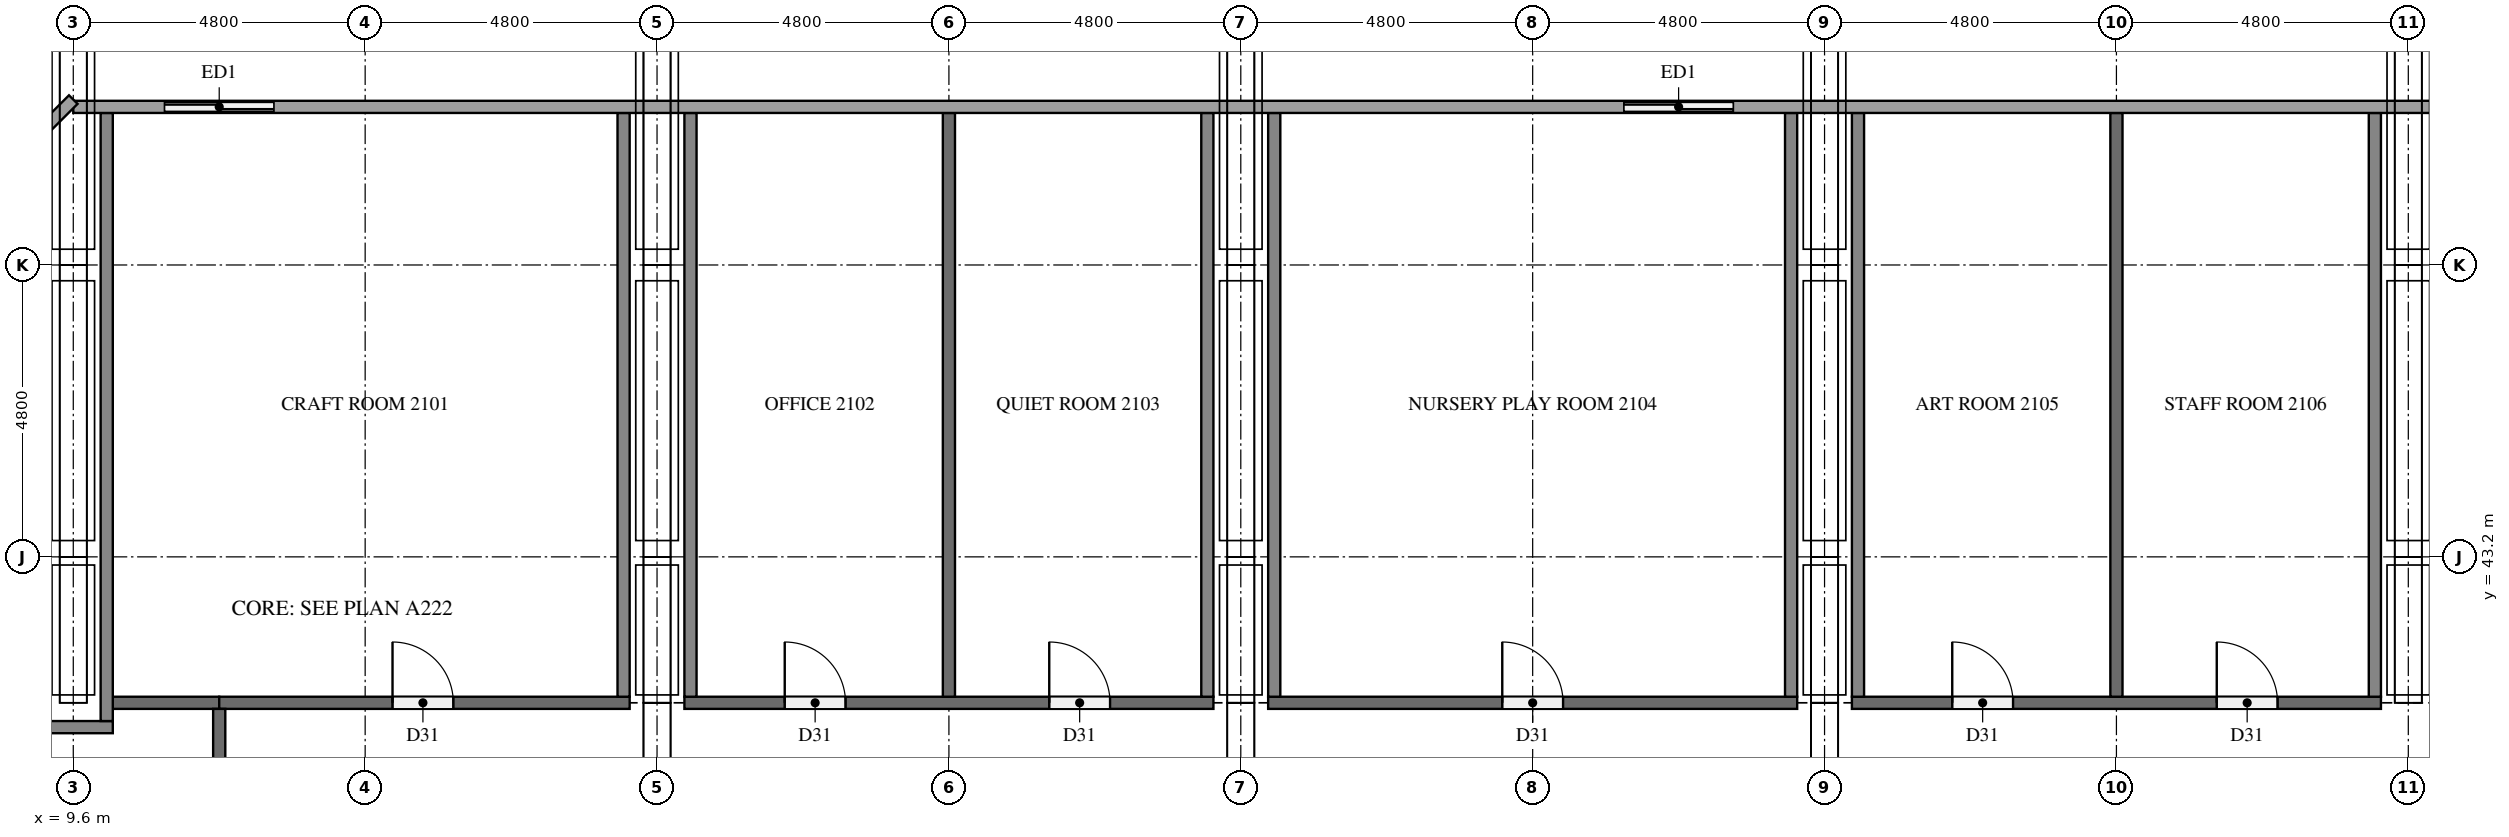
"""IFC4 building model, lengths in metres.
Left out: names, types, materials, properties, quantities, classifications, styles, units other than length and angle.
Written with IfcOpenShell. Run it as: python <this file> out.ifc"""

import sys

from ifc_helpers import new_model, si_unit, direction, frame, frame_2d, origin, place, context, subcontext, project, spatial, rectangle, extrude, element, fill, save


model = new_model("IFC4")
c1 = context("Model", 3, precision=1e-05, world=origin(), true_north=direction((0.0, 1.0)))
c2 = subcontext(c1, "Body", "Model", "MODEL_VIEW")
j1 = project(units=[si_unit("LENGTHUNIT", "METRE"), si_unit("PLANEANGLEUNIT", "RADIAN")], contexts=[c1])
p1 = place(None, origin())
s1 = spatial("IfcSite", under=j1, at=p1, CompositionType="ELEMENT")
p2 = place(p1, origin())
s2 = spatial("IfcBuilding", under=s1, at=p2, CompositionType="ELEMENT")
p3 = place(p2, frame((0.0, 0.0, 83.8)))
s3 = spatial("IfcBuildingStorey", under=s2, at=p3, CompositionType="ELEMENT", Elevation=83.8)
p4 = place(p3, frame((37.2, 50.6, 0.0), z_axis=(0.0, 0.0, 1.0), x_axis=(-1.0, 0.0, 0.0)))
e1 = element("IfcWall", 1, at=p4, inside=s3, PredefinedType="SOLIDWALL", context=c2, shape_type="SweptSolid", body=[
    extrude(rectangle(XDim=2.4, YDim=0.15, at=frame_2d((1.2, 0.0))), origin(), (0.0, 0.0, 1.0), 5.1),
])
p5 = place(p4, frame((0.3, 0.0, 0.0)))
e2 = element("IfcOpeningElement", 2, at=p5, cuts=e1, PredefinedType="OPENING", context=c2, shape_type="SweptSolid", body=[
    extrude(rectangle(XDim=1.8, YDim=2.4, at=frame_2d((0.9, 1.2))), frame((0.0, 0.085, 0.0), z_axis=(0.0, -1.0, 0.0), x_axis=(1.0, 0.0, 0.0)), (0.0, 0.0, 1.0), 0.17),
])
p6 = place(p3, frame((13.2, 50.6, 0.0), z_axis=(0.0, 0.0, 1.0), x_axis=(-1.0, 0.0, 0.0)))
e3 = element("IfcWall", 3, at=p6, inside=s3, PredefinedType="SOLIDWALL", context=c2, shape_type="SweptSolid", body=[
    extrude(rectangle(XDim=2.4, YDim=0.15, at=frame_2d((1.2, 0.0))), origin(), (0.0, 0.0, 1.0), 5.1),
])
p7 = place(p6, frame((0.3, 0.0, 0.0)))
e4 = element("IfcOpeningElement", 4, at=p7, cuts=e3, PredefinedType="OPENING", context=c2, shape_type="SweptSolid", body=[
    extrude(rectangle(XDim=1.8, YDim=2.4, at=frame_2d((0.9, 1.2))), frame((0.0, 0.085, 0.0), z_axis=(0.0, -1.0, 0.0), x_axis=(1.0, 0.0, 0.0)), (0.0, 0.0, 1.0), 0.17),
])
p8 = place(p3, frame((8.95, 40.4, 0.0), z_axis=(0.0, 0.0, 1.0), x_axis=(1.0, 0.0, 0.0)))
e5 = element("IfcWall", 5, at=p8, inside=s3, PredefinedType="PARTITIONING", context=c2, shape_type="SweptSolid", body=[
    extrude(rectangle(XDim=1.3, YDim=0.2, at=frame_2d((0.65, 0.0))), origin(), (0.0, 0.0, 1.0), 5.1),
])
p9 = place(p3, frame((10.25, 40.8, 0.0), z_axis=(0.0, 0.0, 1.0), x_axis=(1.0, 0.0, 0.0)))
e6 = element("IfcWall", 6, at=p9, inside=s3, PredefinedType="PARTITIONING", context=c2, shape_type="SweptSolid", body=[
    extrude(rectangle(XDim=1.75, YDim=0.2, at=frame_2d((0.875, 0.0))), origin(), (0.0, 0.0, 1.0), 5.1),
])
p10 = place(p3, frame((12.0, 40.8, 0.0), z_axis=(0.0, 0.0, 1.0), x_axis=(1.0, 0.0, 0.0)))
e7 = element("IfcWall", 7, at=p10, inside=s3, PredefinedType="PARTITIONING", context=c2, shape_type="SweptSolid", body=[
    extrude(rectangle(XDim=6.75, YDim=0.2, at=frame_2d((3.375, 0.0))), origin(), (0.0, 0.0, 1.0), 5.1),
])
p11 = place(p10, frame((2.85, 0.0, 0.0)))
e8 = element("IfcOpeningElement", 8, at=p11, cuts=e7, PredefinedType="OPENING", context=c2, shape_type="SweptSolid", body=[
    extrude(rectangle(XDim=1.0, YDim=2.1, at=frame_2d((0.5, 1.05))), frame((0.0, 0.11, 0.0), z_axis=(0.0, -1.0, 0.0), x_axis=(1.0, 0.0, 0.0)), (0.0, 0.0, 1.0), 0.22),
])
p12 = place(p3, frame((19.65, 40.8, 0.0), z_axis=(0.0, 0.0, 1.0), x_axis=(1.0, 0.0, 0.0)))
e9 = element("IfcWall", 9, at=p12, inside=s3, PredefinedType="PARTITIONING", context=c2, shape_type="SweptSolid", body=[
    extrude(rectangle(XDim=8.7, YDim=0.2, at=frame_2d((4.35, 0.0))), origin(), (0.0, 0.0, 1.0), 5.1),
])
p13 = place(p12, frame((1.65, 0.0, 0.0)))
e10 = element("IfcOpeningElement", 10, at=p13, cuts=e9, PredefinedType="OPENING", context=c2, shape_type="SweptSolid", body=[
    extrude(rectangle(XDim=1.0, YDim=2.1, at=frame_2d((0.5, 1.05))), frame((0.0, 0.11, 0.0), z_axis=(0.0, -1.0, 0.0), x_axis=(1.0, 0.0, 0.0)), (0.0, 0.0, 1.0), 0.22),
])
p14 = place(p12, frame((6.0, 0.0, 0.0)))
e11 = element("IfcOpeningElement", 11, at=p14, cuts=e9, PredefinedType="OPENING", context=c2, shape_type="SweptSolid", body=[
    extrude(rectangle(XDim=1.0, YDim=2.1, at=frame_2d((0.5, 1.05))), frame((0.0, 0.11, 0.0), z_axis=(0.0, -1.0, 0.0), x_axis=(1.0, 0.0, 0.0)), (0.0, 0.0, 1.0), 0.22),
])
p15 = place(p3, frame((29.25, 40.8, 0.0), z_axis=(0.0, 0.0, 1.0), x_axis=(1.0, 0.0, 0.0)))
e12 = element("IfcWall", 12, at=p15, inside=s3, PredefinedType="PARTITIONING", context=c2, shape_type="SweptSolid", body=[
    extrude(rectangle(XDim=8.7, YDim=0.2, at=frame_2d((4.35, 0.0))), origin(), (0.0, 0.0, 1.0), 5.1),
])
p16 = place(p15, frame((3.85, 0.0, 0.0)))
e13 = element("IfcOpeningElement", 13, at=p16, cuts=e12, PredefinedType="OPENING", context=c2, shape_type="SweptSolid", body=[
    extrude(rectangle(XDim=1.0, YDim=2.1, at=frame_2d((0.5, 1.05))), frame((0.0, 0.11, 0.0), z_axis=(0.0, -1.0, 0.0), x_axis=(1.0, 0.0, 0.0)), (0.0, 0.0, 1.0), 0.22),
])
p17 = place(p3, frame((38.85, 40.8, 0.0), z_axis=(0.0, 0.0, 1.0), x_axis=(1.0, 0.0, 0.0)))
e14 = element("IfcWall", 14, at=p17, inside=s3, PredefinedType="PARTITIONING", context=c2, shape_type="SweptSolid", body=[
    extrude(rectangle(XDim=8.7, YDim=0.2, at=frame_2d((4.35, 0.0))), origin(), (0.0, 0.0, 1.0), 5.1),
])
p18 = place(p17, frame((1.65, 0.0, 0.0)))
e15 = element("IfcOpeningElement", 15, at=p18, cuts=e14, PredefinedType="OPENING", context=c2, shape_type="SweptSolid", body=[
    extrude(rectangle(XDim=1.0, YDim=2.1, at=frame_2d((0.5, 1.05))), frame((0.0, 0.11, 0.0), z_axis=(0.0, -1.0, 0.0), x_axis=(1.0, 0.0, 0.0)), (0.0, 0.0, 1.0), 0.22),
])
p19 = place(p17, frame((6.0, 0.0, 0.0)))
e16 = element("IfcOpeningElement", 16, at=p19, cuts=e14, PredefinedType="OPENING", context=c2, shape_type="SweptSolid", body=[
    extrude(rectangle(XDim=1.0, YDim=2.1, at=frame_2d((0.5, 1.05))), frame((0.0, 0.11, 0.0), z_axis=(0.0, -1.0, 0.0), x_axis=(1.0, 0.0, 0.0)), (0.0, 0.0, 1.0), 0.22),
])
p20 = place(p3, frame((10.15, 40.5, 0.0), z_axis=(0.0, 0.0, 1.0), x_axis=(0.0, 1.0, 0.0)))
e17 = element("IfcWall", 17, at=p20, inside=s3, PredefinedType="PARTITIONING", context=c2, shape_type="SweptSolid", body=[
    extrude(rectangle(XDim=10.0, YDim=0.2, at=frame_2d((5.0, 0.0))), origin(), (0.0, 0.0, 1.0), 5.1),
])
p21 = place(p3, frame((12.0, 12.1, 0.0), z_axis=(0.0, 0.0, 1.0), x_axis=(0.0, 1.0, 0.0)))
e18 = element("IfcWall", 18, at=p21, inside=s3, PredefinedType="PARTITIONING", context=c2, shape_type="SweptSolid", body=[
    extrude(rectangle(XDim=28.6, YDim=0.2, at=frame_2d((14.3, 0.0))), origin(), (0.0, 0.0, 1.0), 5.1),
])
p22 = place(p21, frame((3.05, 0.0, 0.0)))
e19 = element("IfcOpeningElement", 19, at=p22, cuts=e18, PredefinedType="OPENING", context=c2, shape_type="SweptSolid", body=[
    extrude(rectangle(XDim=1.0, YDim=2.1, at=frame_2d((0.5, 1.05))), frame((0.0, 0.11, 0.0), z_axis=(0.0, -1.0, 0.0), x_axis=(1.0, 0.0, 0.0)), (0.0, 0.0, 1.0), 0.22),
])
p23 = place(p21, frame((9.05, 0.0, 0.0)))
e20 = element("IfcOpeningElement", 20, at=p23, cuts=e18, PredefinedType="OPENING", context=c2, shape_type="SweptSolid", body=[
    extrude(rectangle(XDim=1.0, YDim=2.1, at=frame_2d((0.5, 1.05))), frame((0.0, 0.11, 0.0), z_axis=(0.0, -1.0, 0.0), x_axis=(1.0, 0.0, 0.0)), (0.0, 0.0, 1.0), 0.22),
])
p24 = place(p21, frame((13.85, 0.0, 0.0)))
e21 = element("IfcOpeningElement", 21, at=p24, cuts=e18, PredefinedType="OPENING", context=c2, shape_type="SweptSolid", body=[
    extrude(rectangle(XDim=1.0, YDim=2.1, at=frame_2d((0.5, 1.05))), frame((0.0, 0.11, 0.0), z_axis=(0.0, -1.0, 0.0), x_axis=(1.0, 0.0, 0.0)), (0.0, 0.0, 1.0), 0.22),
])
p25 = place(p21, frame((18.65, 0.0, 0.0)))
e22 = element("IfcOpeningElement", 22, at=p25, cuts=e18, PredefinedType="OPENING", context=c2, shape_type="SweptSolid", body=[
    extrude(rectangle(XDim=1.0, YDim=2.1, at=frame_2d((0.5, 1.05))), frame((0.0, 0.11, 0.0), z_axis=(0.0, -1.0, 0.0), x_axis=(1.0, 0.0, 0.0)), (0.0, 0.0, 1.0), 0.22),
])
p26 = place(p21, frame((24.55, 0.0, 0.0)))
e23 = element("IfcOpeningElement", 23, at=p26, cuts=e18, PredefinedType="OPENING", context=c2, shape_type="SweptSolid", body=[
    extrude(rectangle(XDim=1.0, YDim=2.1, at=frame_2d((0.5, 1.05))), frame((0.0, 0.11, 0.0), z_axis=(0.0, -1.0, 0.0), x_axis=(1.0, 0.0, 0.0)), (0.0, 0.0, 1.0), 0.22),
])
for number, where, z_axis, x_axis in (
    (24, (18.65, 40.9, 0.0), (0.0, 0.0, 1.0), (0.0, 1.0, 0.0)),
    (25, (19.75, 40.9, 0.0), (0.0, 0.0, 1.0), (0.0, 1.0, 0.0)),
    (26, (24.0, 40.9, 0.0), (0.0, 0.0, 1.0), (0.0, 1.0, 0.0)),
    (27, (28.25, 40.9, 0.0), (0.0, 0.0, 1.0), (0.0, 1.0, 0.0)),
    (28, (29.35, 40.9, 0.0), (0.0, 0.0, 1.0), (0.0, 1.0, 0.0)),
    (29, (37.85, 40.9, 0.0), (0.0, 0.0, 1.0), (0.0, 1.0, 0.0)),
    (30, (38.95, 40.9, 0.0), (0.0, 0.0, 1.0), (0.0, 1.0, 0.0)),
    (31, (43.2, 40.9, 0.0), (0.0, 0.0, 1.0), (0.0, 1.0, 0.0)),
    (32, (47.45, 40.9, 0.0), (0.0, 0.0, 1.0), (0.0, 1.0, 0.0)),
):
    element("IfcWall", number, at=place(p3, frame(where, z_axis=z_axis, x_axis=x_axis)), inside=s3, PredefinedType="PARTITIONING", context=c2, shape_type="SweptSolid", body=[
        extrude(rectangle(XDim=9.6, YDim=0.2, at=frame_2d((4.8, 0.0))), origin(), (0.0, 0.0, 1.0), 5.1),
    ])
p27 = place(p5, origin())
e33 = element("IfcDoor", 33, at=p27, inside=s3, OperationType="SLIDING_TO_RIGHT", PredefinedType="DOOR", context=c2, shape_type="SweptSolid", body=[
    extrude(rectangle(XDim=1.8, YDim=2.4, at=frame_2d((0.9, 1.2))), frame((0.0, 0.025, 0.0), z_axis=(0.0, -1.0, 0.0), x_axis=(1.0, 0.0, 0.0)), (0.0, 0.0, 1.0), 0.05),
])
fill(e2, e33)
p28 = place(p7, origin())
e34 = element("IfcDoor", 34, at=p28, inside=s3, OperationType="SLIDING_TO_LEFT", PredefinedType="DOOR", context=c2, shape_type="SweptSolid", body=[
    extrude(rectangle(XDim=1.8, YDim=2.4, at=frame_2d((0.9, 1.2))), frame((0.0, 0.025, 0.0), z_axis=(0.0, -1.0, 0.0), x_axis=(1.0, 0.0, 0.0)), (0.0, 0.0, 1.0), 0.05),
])
fill(e4, e34)
p29 = place(p11, origin())
e35 = element("IfcDoor", 35, at=p29, inside=s3, OperationType="SINGLE_SWING_LEFT", PredefinedType="DOOR", context=c2, shape_type="SweptSolid", body=[
    extrude(rectangle(XDim=1.0, YDim=2.1, at=frame_2d((0.5, 1.05))), frame((0.0, 0.025, 0.0), z_axis=(0.0, -1.0, 0.0), x_axis=(1.0, 0.0, 0.0)), (0.0, 0.0, 1.0), 0.05),
])
fill(e8, e35)
p30 = place(p13, origin())
e36 = element("IfcDoor", 36, at=p30, inside=s3, OperationType="SINGLE_SWING_LEFT", PredefinedType="DOOR", context=c2, shape_type="SweptSolid", body=[
    extrude(rectangle(XDim=1.0, YDim=2.1, at=frame_2d((0.5, 1.05))), frame((0.0, 0.025, 0.0), z_axis=(0.0, -1.0, 0.0), x_axis=(1.0, 0.0, 0.0)), (0.0, 0.0, 1.0), 0.05),
])
fill(e10, e36)
p31 = place(p14, origin())
e37 = element("IfcDoor", 37, at=p31, inside=s3, OperationType="SINGLE_SWING_LEFT", PredefinedType="DOOR", context=c2, shape_type="SweptSolid", body=[
    extrude(rectangle(XDim=1.0, YDim=2.1, at=frame_2d((0.5, 1.05))), frame((0.0, 0.025, 0.0), z_axis=(0.0, -1.0, 0.0), x_axis=(1.0, 0.0, 0.0)), (0.0, 0.0, 1.0), 0.05),
])
fill(e11, e37)
p32 = place(p16, origin())
e38 = element("IfcDoor", 38, at=p32, inside=s3, OperationType="SINGLE_SWING_LEFT", PredefinedType="DOOR", context=c2, shape_type="SweptSolid", body=[
    extrude(rectangle(XDim=1.0, YDim=2.1, at=frame_2d((0.5, 1.05))), frame((0.0, 0.025, 0.0), z_axis=(0.0, -1.0, 0.0), x_axis=(1.0, 0.0, 0.0)), (0.0, 0.0, 1.0), 0.05),
])
fill(e13, e38)
p33 = place(p18, origin())
e39 = element("IfcDoor", 39, at=p33, inside=s3, OperationType="SINGLE_SWING_LEFT", PredefinedType="DOOR", context=c2, shape_type="SweptSolid", body=[
    extrude(rectangle(XDim=1.0, YDim=2.1, at=frame_2d((0.5, 1.05))), frame((0.0, 0.025, 0.0), z_axis=(0.0, -1.0, 0.0), x_axis=(1.0, 0.0, 0.0)), (0.0, 0.0, 1.0), 0.05),
])
fill(e15, e39)
p34 = place(p19, origin())
e40 = element("IfcDoor", 40, at=p34, inside=s3, OperationType="SINGLE_SWING_LEFT", PredefinedType="DOOR", context=c2, shape_type="SweptSolid", body=[
    extrude(rectangle(XDim=1.0, YDim=2.1, at=frame_2d((0.5, 1.05))), frame((0.0, 0.025, 0.0), z_axis=(0.0, -1.0, 0.0), x_axis=(1.0, 0.0, 0.0)), (0.0, 0.0, 1.0), 0.05),
])
fill(e16, e40)
save(model, sys.argv[1])
